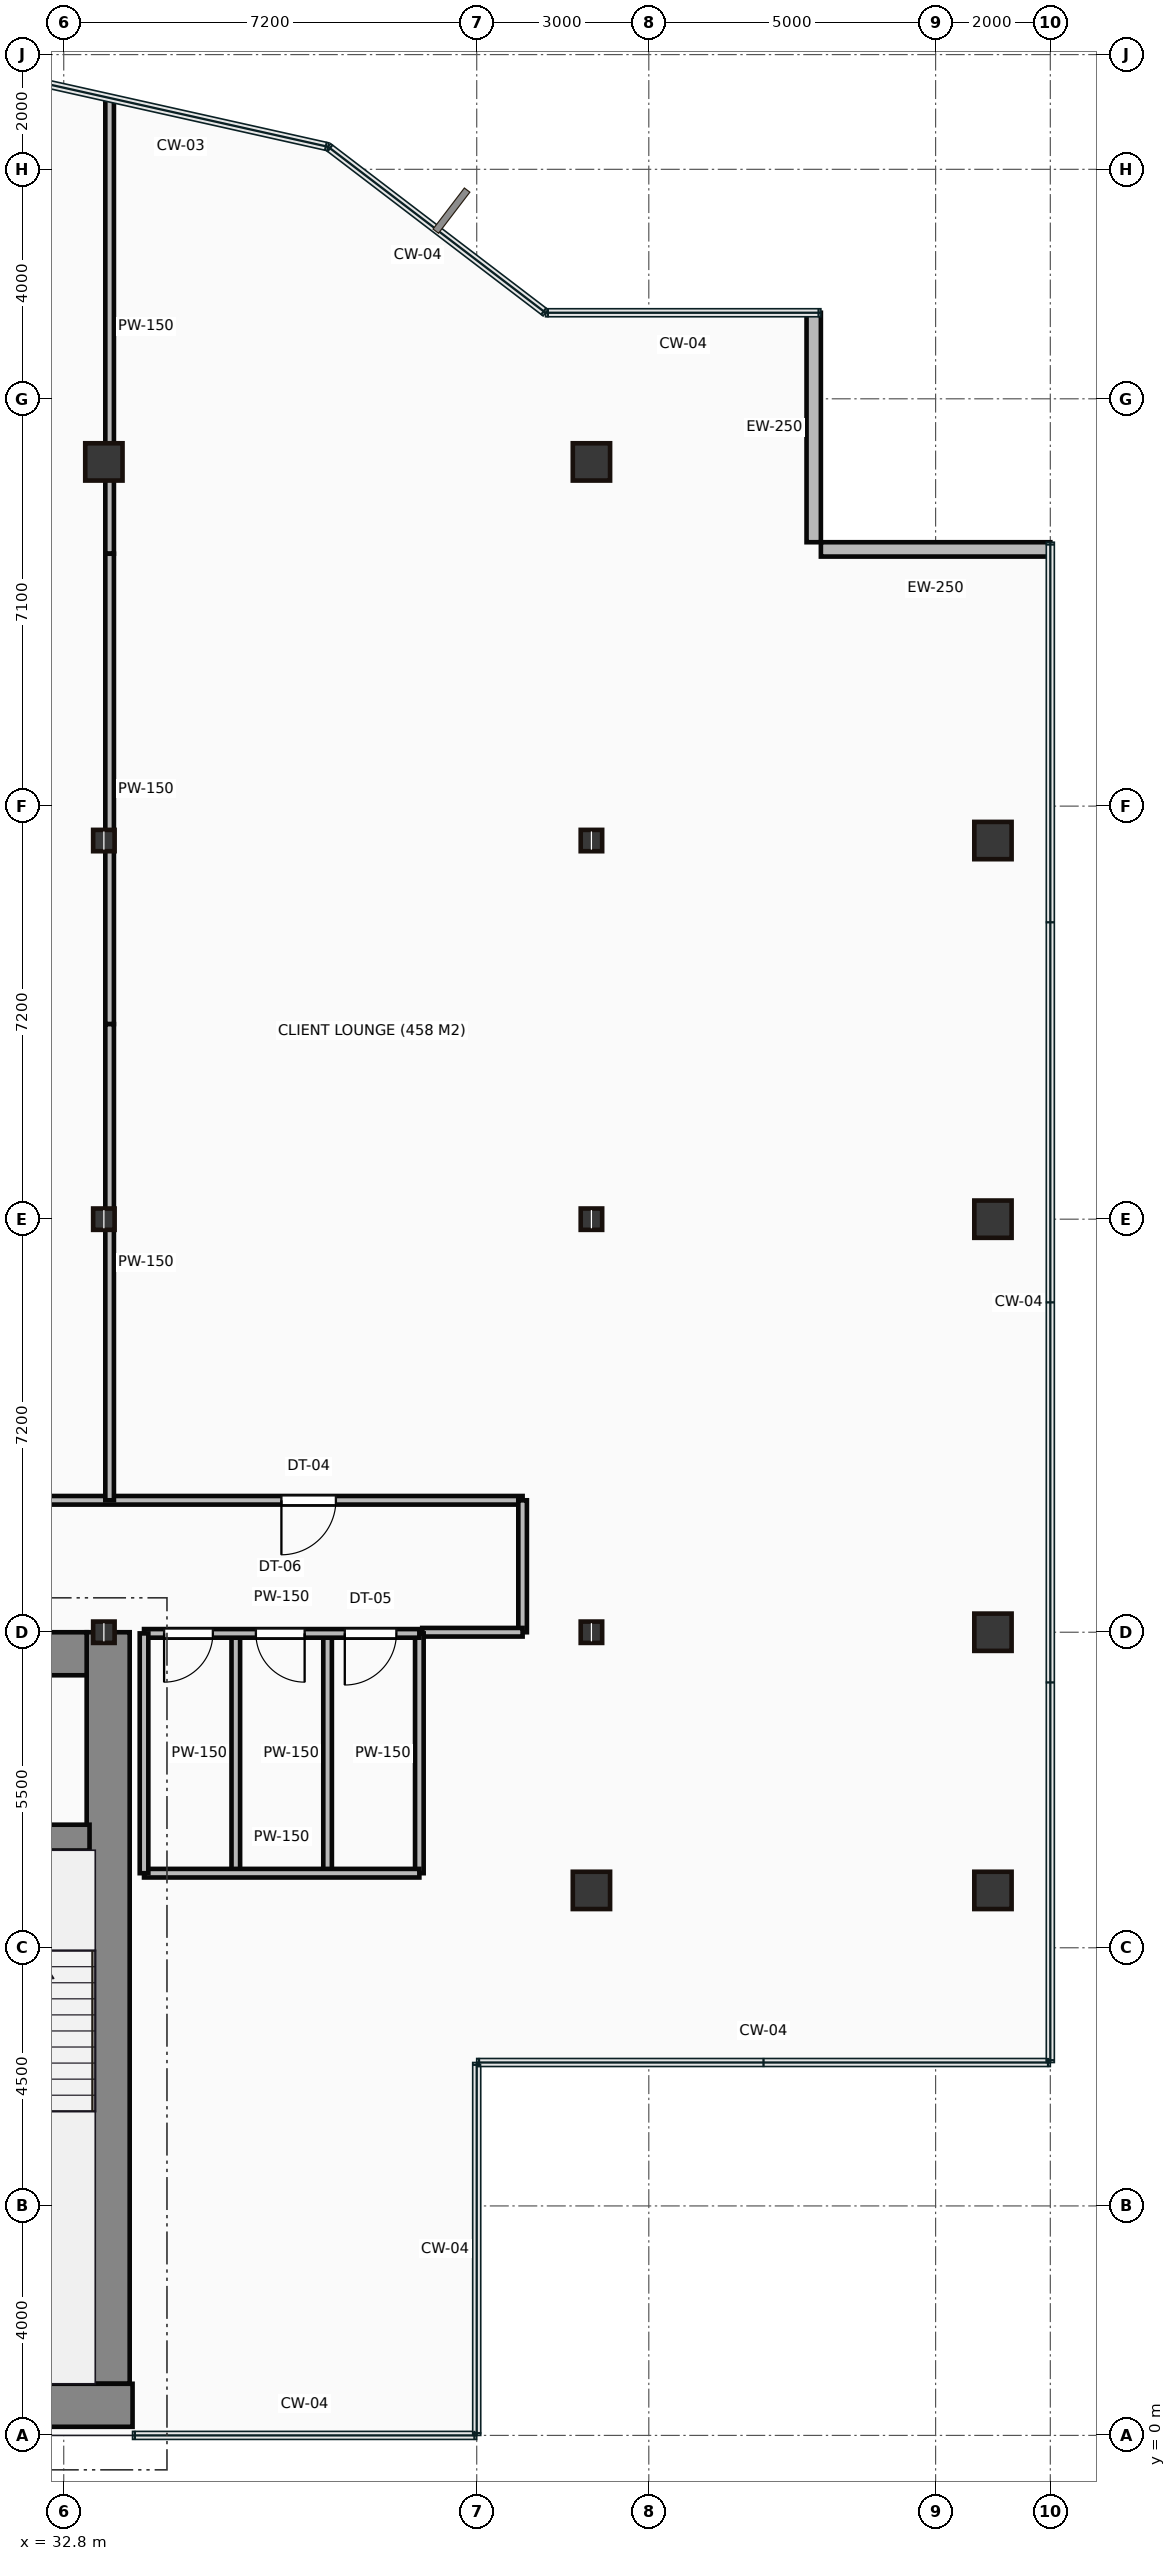
"""IFC4 building model, lengths in metres.
Left out: names, types, materials, properties, quantities, classifications, styles, units other than length and angle.
Written with IfcOpenShell. Run it as: python <this file> out.ifc"""

import sys

from ifc_helpers import new_model, si_unit, direction, frame, frame_2d, origin, origin_2d, place, context, subcontext, project, spatial, rectangle, hollow_rectangle, i_section, extrude, source, transform, mapped, element, fill, save


model = new_model("IFC4")
c1 = context("Model", 3, precision=1e-05, world=origin(), true_north=direction((0.0, 1.0)))
c2 = subcontext(c1, "Body", "Model", "MODEL_VIEW")
j1 = project(units=[si_unit("LENGTHUNIT", "METRE"), si_unit("PLANEANGLEUNIT", "RADIAN")], contexts=[c1])
p1 = place(None, origin())
s1 = spatial("IfcSite", under=j1, at=p1, CompositionType="ELEMENT")
p2 = place(p1, origin())
s2 = spatial("IfcBuilding", under=s1, at=p2, CompositionType="ELEMENT")
p3 = place(p2, frame((0.0, 0.0, 155.2)))
s3 = spatial("IfcBuildingStorey", under=s2, at=p3, CompositionType="ELEMENT", Elevation=155.2)
m1 = source(origin(), c2, "Body", "SweptSolid", [
    extrude(rectangle(XDim=29.5, YDim=0.75, at=frame_2d((14.75, 0.0))), origin(), (0.0, 0.0, 1.0), 3.65),
])
p4 = place(p3, frame((4.5, 0.525, 0.0), z_axis=(0.0, 0.0, 1.0), x_axis=(1.0, 0.0, 0.0)))
e1 = element("IfcWall", 1, at=p4, inside=s3, PredefinedType="SHEAR", context=c2, shape_type="MappedRepresentation", body=[
    mapped(m1, transform((0.0, 0.0, 0.0))),
])
m2 = source(origin(), c2, "Body", "SweptSolid", [
    extrude(rectangle(XDim=13.1, YDim=0.75, at=frame_2d((6.55, 0.0))), origin(), (0.0, 0.0, 1.0), 3.65),
])
p5 = place(p3, frame((33.575, 0.9, 0.0), z_axis=(0.0, 0.0, 1.0), x_axis=(0.0, 1.0, 0.0)))
e2 = element("IfcWall", 2, at=p5, inside=s3, PredefinedType="SHEAR", context=c2, shape_type="MappedRepresentation", body=[
    mapped(m2, transform((0.0, 0.0, 0.0))),
])
m3 = source(origin(), c2, "Body", "SweptSolid", [
    extrude(rectangle(XDim=12.6, YDim=0.75, at=frame_2d((6.3, 0.0))), origin(), (0.0, 0.0, 1.0), 3.65),
])
p6 = place(p3, frame((20.6, 13.625, 0.0), z_axis=(0.0, 0.0, 1.0), x_axis=(1.0, 0.0, 0.0)))
e3 = element("IfcWall", 3, at=p6, inside=s3, PredefinedType="SHEAR", context=c2, shape_type="MappedRepresentation", body=[
    mapped(m3, transform((0.0, 0.0, 0.0))),
])
p7 = place(p6, frame((9.25, 0.0, 0.0)))
e4 = element("IfcOpeningElement", 4, at=p7, cuts=e3, PredefinedType="OPENING", context=c2, shape_type="SweptSolid", body=[
    extrude(rectangle(XDim=1.1, YDim=2.15, at=frame_2d((0.55, 1.075))), frame((0.0, 0.385, 0.0), z_axis=(0.0, -1.0, 0.0), x_axis=(1.0, 0.0, 0.0)), (0.0, 0.0, 1.0), 0.77),
])
m4 = source(origin(), c2, "Body", "SweptSolid", [
    extrude(rectangle(XDim=3.39, YDim=0.45, at=frame_2d((1.695, 0.0))), origin(), (0.0, 0.0, 1.0), 3.65),
])
p8 = place(p3, frame((29.86, 10.42, 0.0), z_axis=(0.0, 0.0, 1.0), x_axis=(1.0, 0.0, 0.0)))
e5 = element("IfcWall", 5, at=p8, inside=s3, PredefinedType="SHEAR", context=c2, shape_type="MappedRepresentation", body=[
    mapped(m4, transform((0.0, 0.0, 0.0))),
])
p9 = place(p8, frame((1.1, 0.0, 0.0)))
e6 = element("IfcOpeningElement", 6, at=p9, cuts=e5, PredefinedType="OPENING", context=c2, shape_type="SweptSolid", body=[
    extrude(rectangle(XDim=1.1, YDim=2.15, at=frame_2d((0.55, 1.075))), frame((0.0, 0.235, 0.0), z_axis=(0.0, -1.0, 0.0), x_axis=(1.0, 0.0, 0.0)), (0.0, 0.0, 1.0), 0.47),
])
m5 = source(origin(), c2, "Body", "SweptSolid", [
    extrude(i_section(OverallWidth=0.374, OverallDepth=0.372, WebThickness=0.016, FlangeThickness=0.026, at=origin_2d()), origin(), (0.0, 0.0, 1.0), 3.65),
])
for number, where, z_axis, x_axis in (
    (7, (33.5, 14.0, 0.0), (0.0, 0.0, 1.0), (1.0, 0.0, 0.0)),
    (8, (33.5, 21.2, 0.0), (0.0, 0.0, 1.0), (1.0, 0.0, 0.0)),
    (9, (33.5, 27.8, 0.0), (0.0, 0.0, 1.0), (1.0, 0.0, 0.0)),
):
    element("IfcColumn", number, at=place(p3, frame(where, z_axis=z_axis, x_axis=x_axis)), inside=s3, PredefinedType="COLUMN", context=c2, shape_type="MappedRepresentation", body=[
        mapped(m5, transform((0.0, 0.0, 0.0))),
    ])
m6 = source(origin(), c2, "Body", "SweptSolid", [
    extrude(hollow_rectangle(XDim=0.65, YDim=0.65, WallThickness=0.032, at=origin_2d()), origin(), (0.0, 0.0, 1.0), 3.65),
])
for number, where, z_axis, x_axis in (
    (10, (33.5, 34.4, 0.0), (0.0, 0.0, 1.0), (1.0, 0.0, 0.0)),
    (11, (42.0, 9.5, 0.0), (0.0, 0.0, 1.0), (1.0, 0.0, 0.0)),
):
    element("IfcColumn", number, at=place(p3, frame(where, z_axis=z_axis, x_axis=x_axis)), inside=s3, PredefinedType="COLUMN", context=c2, shape_type="MappedRepresentation", body=[
        mapped(m6, transform((0.0, 0.0, 0.0))),
    ])
for number, where, z_axis, x_axis in (
    (12, (42.0, 14.0, 0.0), (0.0, 0.0, 1.0), (1.0, 0.0, 0.0)),
    (13, (42.0, 21.2, 0.0), (0.0, 0.0, 1.0), (1.0, 0.0, 0.0)),
    (14, (42.0, 27.8, 0.0), (0.0, 0.0, 1.0), (1.0, 0.0, 0.0)),
):
    element("IfcColumn", number, at=place(p3, frame(where, z_axis=z_axis, x_axis=x_axis)), inside=s3, PredefinedType="COLUMN", context=c2, shape_type="MappedRepresentation", body=[
        mapped(m5, transform((0.0, 0.0, 0.0))),
    ])
for number, where, z_axis, x_axis in (
    (15, (42.0, 34.4, 0.0), (0.0, 0.0, 1.0), (1.0, 0.0, 0.0)),
    (16, (49.0, 9.5, 0.0), (0.0, 0.0, 1.0), (1.0, 0.0, 0.0)),
    (17, (49.0, 14.0, 0.0), (0.0, 0.0, 1.0), (1.0, 0.0, 0.0)),
    (18, (49.0, 21.2, 0.0), (0.0, 0.0, 1.0), (1.0, 0.0, 0.0)),
    (19, (49.0, 27.8, 0.0), (0.0, 0.0, 1.0), (1.0, 0.0, 0.0)),
):
    element("IfcColumn", number, at=place(p3, frame(where, z_axis=z_axis, x_axis=x_axis)), inside=s3, PredefinedType="COLUMN", context=c2, shape_type="MappedRepresentation", body=[
        mapped(m6, transform((0.0, 0.0, 0.0))),
    ])
m7 = source(origin(), c2, "Body", "SweptSolid", [
    extrude(rectangle(XDim=4.0, YDim=0.25, at=frame_2d((2.0, 0.0))), origin(), (0.0, 0.0, 1.0), 3.4),
])
for number, where, z_axis, x_axis in (
    (20, (50.0, 32.875, 0.0), (0.0, 0.0, 1.0), (-1.0, 0.0, 0.0)),
    (21, (45.875, 33.0, 0.0), (0.0, 0.0, 1.0), (0.0, 1.0, 0.0)),
):
    element("IfcWall", number, at=place(p3, frame(where, z_axis=z_axis, x_axis=x_axis)), inside=s3, PredefinedType="STANDARD", context=c2, shape_type="MappedRepresentation", body=[
        mapped(m7, transform((0.0, 0.0, 0.0))),
    ])
m8 = source(origin(), c2, "Body", "SweptSolid", [
    extrude(rectangle(XDim=4.8, YDim=0.15, at=frame_2d((2.4, 0.0))), origin(), (0.0, 0.0, 1.0), 2.76),
])
p10 = place(p3, frame((34.2, 13.98, 0.0), z_axis=(0.0, 0.0, 1.0), x_axis=(1.0, 0.0, 0.0)))
e22 = element("IfcWall", 22, at=p10, inside=s3, PredefinedType="PARTITIONING", context=c2, shape_type="MappedRepresentation", body=[
    mapped(m8, transform((0.0, 0.0, 0.0))),
])
p11 = place(p10, frame((0.35, 0.0, 0.0)))
e23 = element("IfcOpeningElement", 23, at=p11, cuts=e22, PredefinedType="OPENING", context=c2, shape_type="SweptSolid", body=[
    extrude(rectangle(XDim=0.85, YDim=2.1, at=frame_2d((0.425, 1.05))), frame((0.0, 0.085, 0.0), z_axis=(0.0, -1.0, 0.0), x_axis=(1.0, 0.0, 0.0)), (0.0, 0.0, 1.0), 0.17),
])
p12 = place(p10, frame((1.95, 0.0, 0.0)))
e24 = element("IfcOpeningElement", 24, at=p12, cuts=e22, PredefinedType="OPENING", context=c2, shape_type="SweptSolid", body=[
    extrude(rectangle(XDim=0.85, YDim=2.1, at=frame_2d((0.425, 1.05))), frame((0.0, 0.085, 0.0), z_axis=(0.0, -1.0, 0.0), x_axis=(1.0, 0.0, 0.0)), (0.0, 0.0, 1.0), 0.17),
])
p13 = place(p10, frame((3.5, 0.0, 0.0)))
e25 = element("IfcOpeningElement", 25, at=p13, cuts=e22, PredefinedType="OPENING", context=c2, shape_type="SweptSolid", body=[
    extrude(rectangle(XDim=0.9, YDim=2.1, at=frame_2d((0.45, 1.05))), frame((0.0, 0.085, 0.0), z_axis=(0.0, -1.0, 0.0), x_axis=(1.0, 0.0, 0.0)), (0.0, 0.0, 1.0), 0.17),
])
m9 = source(origin(), c2, "Body", "SweptSolid", [
    extrude(rectangle(XDim=4.8, YDim=0.15, at=frame_2d((2.4, 0.0))), origin(), (0.0, 0.0, 1.0), 3.4),
])
p14 = place(p3, frame((34.2, 9.8, 0.0), z_axis=(0.0, 0.0, 1.0), x_axis=(1.0, 0.0, 0.0)))
e26 = element("IfcWall", 26, at=p14, inside=s3, PredefinedType="PARTITIONING", context=c2, shape_type="MappedRepresentation", body=[
    mapped(m9, transform((0.0, 0.0, 0.0))),
])
m10 = source(origin(), c2, "Body", "SweptSolid", [
    extrude(rectangle(XDim=4.18, YDim=0.15, at=frame_2d((2.09, 0.0))), origin(), (0.0, 0.0, 1.0), 3.4),
])
for number, where, z_axis, x_axis in (
    (27, (39.0, 9.8, 0.0), (0.0, 0.0, 1.0), (0.0, 1.0, 0.0)),
    (28, (34.2, 9.8, 0.0), (0.0, 0.0, 1.0), (0.0, 1.0, 0.0)),
    (29, (35.8, 9.8, 0.0), (0.0, 0.0, 1.0), (0.0, 1.0, 0.0)),
    (30, (37.4, 9.8, 0.0), (0.0, 0.0, 1.0), (0.0, 1.0, 0.0)),
):
    element("IfcWall", number, at=place(p3, frame(where, z_axis=z_axis, x_axis=x_axis)), inside=s3, PredefinedType="PARTITIONING", context=c2, shape_type="MappedRepresentation", body=[
        mapped(m10, transform((0.0, 0.0, 0.0))),
    ])
m11 = source(origin(), c2, "Body", "SweptSolid", [
    extrude(rectangle(XDim=28.75, YDim=0.15, at=frame_2d((14.375, 0.0))), origin(), (0.0, 0.0, 1.0), 3.4),
])
p15 = place(p3, frame((12.05, 16.3, 0.0), z_axis=(0.0, 0.0, 1.0), x_axis=(1.0, 0.0, 0.0)))
e31 = element("IfcWall", 31, at=p15, inside=s3, PredefinedType="PARTITIONING", context=c2, shape_type="MappedRepresentation", body=[
    mapped(m11, transform((0.0, 0.0, 0.0))),
])
p16 = place(p15, frame((4.83, 0.0, 0.0)))
e32 = element("IfcOpeningElement", 32, at=p16, cuts=e31, PredefinedType="OPENING", context=c2, shape_type="SweptSolid", body=[
    extrude(rectangle(XDim=0.95, YDim=2.15, at=frame_2d((0.475, 1.075))), frame((0.0, 0.085, 0.0), z_axis=(0.0, -1.0, 0.0), x_axis=(1.0, 0.0, 0.0)), (0.0, 0.0, 1.0), 0.17),
])
p17 = place(p15, frame((15.475, 0.0, 0.0)))
e33 = element("IfcOpeningElement", 33, at=p17, cuts=e31, PredefinedType="OPENING", context=c2, shape_type="SweptSolid", body=[
    extrude(rectangle(XDim=0.95, YDim=2.15, at=frame_2d((0.475, 1.075))), frame((0.0, 0.085, 0.0), z_axis=(0.0, -1.0, 0.0), x_axis=(1.0, 0.0, 0.0)), (0.0, 0.0, 1.0), 0.17),
])
p18 = place(p15, frame((24.545, 0.0, 0.0)))
e34 = element("IfcOpeningElement", 34, at=p18, cuts=e31, PredefinedType="OPENING", context=c2, shape_type="SweptSolid", body=[
    extrude(rectangle(XDim=0.95, YDim=2.15, at=frame_2d((0.475, 1.075))), frame((0.0, 0.085, 0.0), z_axis=(0.0, -1.0, 0.0), x_axis=(1.0, 0.0, 0.0)), (0.0, 0.0, 1.0), 0.17),
])
m12 = source(origin(), c2, "Body", "SweptSolid", [
    extrude(rectangle(XDim=2.3, YDim=0.15, at=frame_2d((1.15, 0.0))), origin(), (0.0, 0.0, 1.0), 3.4),
])
p19 = place(p3, frame((40.8, 16.3, 0.0), z_axis=(0.0, 0.0, 1.0), x_axis=(0.0, -1.0, 0.0)))
e35 = element("IfcWall", 35, at=p19, inside=s3, PredefinedType="PARTITIONING", context=c2, shape_type="MappedRepresentation", body=[
    mapped(m12, transform((0.0, 0.0, 0.0))),
])
m13 = source(origin(), c2, "Body", "SweptSolid", [
    extrude(rectangle(XDim=1.75, YDim=0.15, at=frame_2d((0.875, 0.0))), origin(), (0.0, 0.0, 1.0), 2.76),
])
p20 = place(p3, frame((40.8, 14.0, 0.0), z_axis=(0.0, 0.0, 1.0), x_axis=(-1.0, 0.0, 0.0)))
e36 = element("IfcWall", 36, at=p20, inside=s3, PredefinedType="PARTITIONING", context=c2, shape_type="MappedRepresentation", body=[
    mapped(m13, transform((0.0, 0.0, 0.0))),
])
m14 = source(origin(), c2, "Body", "SweptSolid", [
    extrude(rectangle(XDim=7.923, YDim=0.15, at=frame_2d((3.962, 0.0))), origin(), (0.0, 0.0, 1.0), 2.76),
])
p21 = place(p3, frame((33.6, 40.723, 0.0), z_axis=(0.0, 0.0, 1.0), x_axis=(0.0, -1.0, 0.0)))
e37 = element("IfcWall", 37, at=p21, inside=s3, PredefinedType="PARTITIONING", context=c2, shape_type="MappedRepresentation", body=[
    mapped(m14, transform((0.0, 0.0, 0.0))),
])
m15 = source(origin(), c2, "Body", "SweptSolid", [
    extrude(rectangle(XDim=8.2, YDim=0.15, at=frame_2d((4.1, 0.0))), origin(), (0.0, 0.0, 1.0), 2.76),
])
p22 = place(p3, frame((33.6, 32.8, 0.0), z_axis=(0.0, 0.0, 1.0), x_axis=(0.0, -1.0, 0.0)))
e38 = element("IfcWall", 38, at=p22, inside=s3, PredefinedType="PARTITIONING", context=c2, shape_type="MappedRepresentation", body=[
    mapped(m15, transform((0.0, 0.0, 0.0))),
])
m16 = source(origin(), c2, "Body", "SweptSolid", [
    extrude(rectangle(XDim=8.3, YDim=0.15, at=frame_2d((4.15, 0.0))), origin(), (0.0, 0.0, 1.0), 2.76),
])
p23 = place(p3, frame((33.6, 24.6, 0.0), z_axis=(0.0, 0.0, 1.0), x_axis=(0.0, -1.0, 0.0)))
e39 = element("IfcWall", 39, at=p23, inside=s3, PredefinedType="PARTITIONING", context=c2, shape_type="MappedRepresentation", body=[
    mapped(m16, transform((0.0, 0.0, 0.0))),
])
m17 = source(origin(), c2, "Body", "SweptSolid", [
    extrude(rectangle(XDim=0.85, YDim=2.1, at=frame_2d((0.425, 1.05))), frame((0.0, 0.025, 0.0), z_axis=(0.0, -1.0, 0.0), x_axis=(1.0, 0.0, 0.0)), (0.0, 0.0, 1.0), 0.05),
])
p24 = place(p11, frame((0.85, 0.0, 0.0), z_axis=(0.0, 0.0, 1.0), x_axis=(-1.0, 0.0, 0.0)))
e40 = element("IfcDoor", 40, at=p24, inside=s3, OperationType="SINGLE_SWING_LEFT", PredefinedType="DOOR", context=c2, shape_type="MappedRepresentation", body=[
    mapped(m17, transform((0.0, 0.0, 0.0))),
])
fill(e23, e40)
p25 = place(p12, frame((0.85, 0.0, 0.0), z_axis=(0.0, 0.0, 1.0), x_axis=(-1.0, 0.0, 0.0)))
e41 = element("IfcDoor", 41, at=p25, inside=s3, OperationType="SINGLE_SWING_RIGHT", PredefinedType="DOOR", context=c2, shape_type="MappedRepresentation", body=[
    mapped(m17, transform((0.0, 0.0, 0.0))),
])
fill(e24, e41)
m18 = source(origin(), c2, "Body", "SweptSolid", [
    extrude(rectangle(XDim=0.9, YDim=2.1, at=frame_2d((0.45, 1.05))), frame((0.0, 0.025, 0.0), z_axis=(0.0, -1.0, 0.0), x_axis=(1.0, 0.0, 0.0)), (0.0, 0.0, 1.0), 0.05),
])
p26 = place(p13, frame((0.9, 0.0, 0.0), z_axis=(0.0, 0.0, 1.0), x_axis=(-1.0, 0.0, 0.0)))
e42 = element("IfcDoor", 42, at=p26, inside=s3, OperationType="SINGLE_SWING_LEFT", PredefinedType="DOOR", context=c2, shape_type="MappedRepresentation", body=[
    mapped(m18, transform((0.0, 0.0, 0.0))),
])
fill(e25, e42)
m19 = source(origin(), c2, "Body", "SweptSolid", [
    extrude(rectangle(XDim=0.95, YDim=2.15, at=frame_2d((0.475, 1.075))), frame((0.0, 0.025, 0.0), z_axis=(0.0, -1.0, 0.0), x_axis=(1.0, 0.0, 0.0)), (0.0, 0.0, 1.0), 0.05),
])
p27 = place(p18, origin())
e43 = element("IfcDoor", 43, at=p27, inside=s3, OperationType="SINGLE_SWING_LEFT", PredefinedType="DOOR", context=c2, shape_type="MappedRepresentation", body=[
    mapped(m19, transform((0.0, 0.0, 0.0))),
])
fill(e34, e43)
save(model, sys.argv[1])
